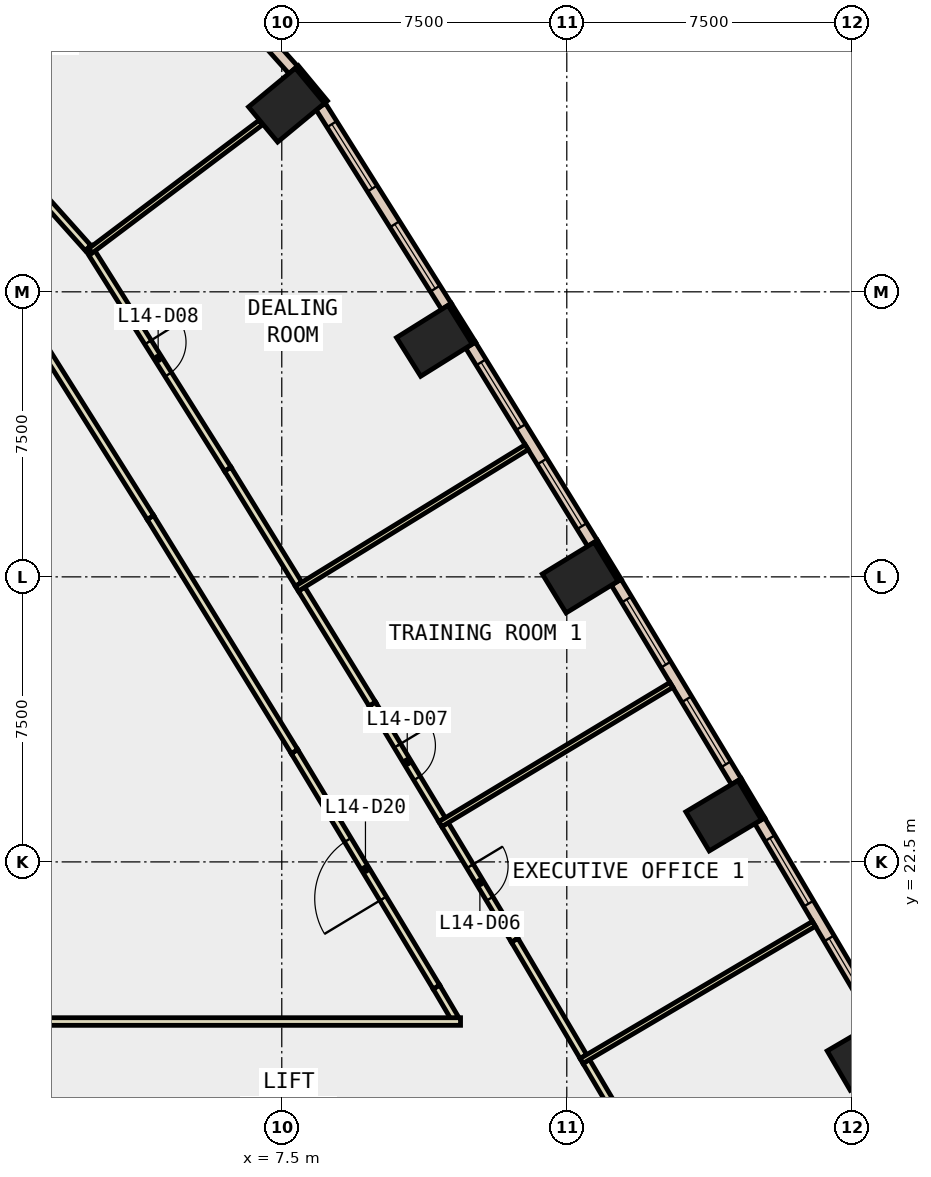
"""IFC4 building model, lengths in metres.
Left out: names, types, materials, properties, quantities, classifications, styles, units other than length and angle.
Written with IfcOpenShell. Run it as: python <this file> out.ifc"""

import sys

from ifc_helpers import new_model, si_unit, direction, frame, frame_2d, origin, origin_2d, place, context, subcontext, project, spatial, rectangle, extrude, element, fill, save


model = new_model("IFC4")
c1 = context("Model", 3, precision=1e-05, world=origin(), true_north=direction((0.0, 1.0)))
c2 = subcontext(c1, "Body", "Model", "MODEL_VIEW")
j1 = project(units=[si_unit("LENGTHUNIT", "METRE"), si_unit("PLANEANGLEUNIT", "RADIAN")], contexts=[c1])
p1 = place(None, origin())
s1 = spatial("IfcSite", under=j1, at=p1, CompositionType="ELEMENT")
p2 = place(p1, origin())
s2 = spatial("IfcBuilding", under=s1, at=p2, CompositionType="ELEMENT")
p3 = place(p2, frame((0.0, 0.0, 68.6)))
s3 = spatial("IfcBuildingStorey", under=s2, at=p3, CompositionType="ELEMENT", Elevation=68.6)
for number, where, z_axis, x_axis in (
    (1, (22.846, 17.413, -0.4), (0.0, 0.0, 1.0), (-0.504, 0.864, 0.0)),
    (2, (19.127, 23.714, -0.4), (0.0, 0.0, 1.0), (-0.513, 0.858, 0.0)),
    (3, (15.351, 29.981, -0.4), (0.0, 0.0, 1.0), (-0.522, 0.853, 0.0)),
    (4, (11.516, 36.211, -0.4), (0.0, 0.0, 1.0), (-0.53, 0.848, 0.0)),
    (5, (7.625, 42.414, -0.4), (0.0, 0.0, 1.0), (-0.638, 0.77, 0.0)),
):
    element("IfcColumn", number, at=place(p3, frame(where, z_axis=z_axis, x_axis=x_axis)), inside=s3, PredefinedType="COLUMN", context=c2, shape_type="SweptSolid", body=[
        extrude(rectangle(XDim=1.2, YDim=1.6, at=origin_2d()), origin(), (0.0, 0.0, 1.0), 4.2),
    ])
for number, where, z_axis, x_axis in (
    (6, (20.165, 23.635, 0.0), (0.0, 0.0, 1.0), (-0.513, 0.858, 0.0)),
    (7, (16.389, 29.912, 0.0), (0.0, 0.0, 1.0), (-0.522, 0.853, 0.0)),
):
    element("IfcWall", number, at=place(p3, frame(where, z_axis=z_axis, x_axis=x_axis)), inside=s3, PredefinedType="STANDARD", context=c2, shape_type="SweptSolid", body=[
        extrude(rectangle(XDim=1.2, YDim=0.1, at=frame_2d((0.6, 0.0))), origin(), (0.0, 0.0, 1.0), 3.8),
    ])
p4 = place(p3, frame((12.555, 36.153, 0.0), z_axis=(0.0, 0.0, 1.0), x_axis=(-0.530273374944, 0.847826720401, 0.0)))
e8 = element("IfcWall", 8, at=p4, inside=s3, PredefinedType="STANDARD", context=c2, shape_type="SweptSolid", body=[
    extrude(rectangle(XDim=1.199, YDim=0.1, at=frame_2d((0.6, 0.0))), origin(), (0.0, 0.0, 1.0), 3.8),
])
p5 = place(p3, frame((8.662, 42.494, 0.0), z_axis=(0.0, 0.0, 1.0), x_axis=(-0.637759271497, 0.770235750676, 0.0)))
e9 = element("IfcWall", 9, at=p5, inside=s3, PredefinedType="STANDARD", context=c2, shape_type="SweptSolid", body=[
    extrude(rectangle(XDim=1.2, YDim=0.1, at=frame_2d((0.6, 0.0))), origin(), (0.0, 0.0, 1.0), 3.8),
])
p6 = place(p3, frame((23.189, 18.307, 0.0), z_axis=(0.0, 0.0, 1.0), x_axis=(-0.508163938648, 0.861260362177, 0.0)))
e10 = element("IfcWall", 10, at=p6, inside=s3, PredefinedType="STANDARD", context=c2, shape_type="SweptSolid", body=[
    extrude(rectangle(XDim=6.126, YDim=0.3, at=frame_2d((3.063, 0.0))), origin(), (0.0, 0.0, 1.0), 3.8),
])
p7 = place(p6, frame((0.531, 0.0, 0.9)))
e11 = element("IfcOpeningElement", 11, at=p7, cuts=e10, PredefinedType="OPENING", context=c2, shape_type="SweptSolid", body=[
    extrude(rectangle(XDim=2.0, YDim=2.6, at=frame_2d((1.0, 1.3))), frame((0.0, 0.16, 0.0), z_axis=(0.0, -1.0, 0.0), x_axis=(1.0, 0.0, 0.0)), (0.0, 0.0, 1.0), 0.32),
])
p8 = place(p6, frame((3.594, 0.0, 0.9)))
e12 = element("IfcOpeningElement", 12, at=p8, cuts=e10, PredefinedType="OPENING", context=c2, shape_type="SweptSolid", body=[
    extrude(rectangle(XDim=2.0, YDim=2.6, at=frame_2d((1.0, 1.3))), frame((0.0, 0.16, 0.0), z_axis=(0.0, -1.0, 0.0), x_axis=(1.0, 0.0, 0.0)), (0.0, 0.0, 1.0), 0.32),
])
p9 = place(p3, frame((19.462, 24.612, 0.0), z_axis=(0.0, 0.0, 1.0), x_axis=(-0.516147563478, 0.856499674674, 0.0)))
e13 = element("IfcWall", 13, at=p9, inside=s3, PredefinedType="STANDARD", context=c2, shape_type="SweptSolid", body=[
    extrude(rectangle(XDim=6.126, YDim=0.3, at=frame_2d((3.063, 0.0))), origin(), (0.0, 0.0, 1.0), 3.8),
])
p10 = place(p9, frame((0.532, 0.0, 0.9)))
e14 = element("IfcOpeningElement", 14, at=p10, cuts=e13, PredefinedType="OPENING", context=c2, shape_type="SweptSolid", body=[
    extrude(rectangle(XDim=2.0, YDim=2.6, at=frame_2d((1.0, 1.3))), frame((0.0, 0.16, 0.0), z_axis=(0.0, -1.0, 0.0), x_axis=(1.0, 0.0, 0.0)), (0.0, 0.0, 1.0), 0.32),
])
p11 = place(p9, frame((3.595, 0.0, 0.9)))
e15 = element("IfcOpeningElement", 15, at=p11, cuts=e13, PredefinedType="OPENING", context=c2, shape_type="SweptSolid", body=[
    extrude(rectangle(XDim=2.0, YDim=2.6, at=frame_2d((1.0, 1.3))), frame((0.0, 0.16, 0.0), z_axis=(0.0, -1.0, 0.0), x_axis=(1.0, 0.0, 0.0)), (0.0, 0.0, 1.0), 0.32),
])
p12 = place(p3, frame((15.677, 30.882, 0.0), z_axis=(0.0, 0.0, 1.0), x_axis=(-0.524239751329, 0.851570715282, 0.0)))
e16 = element("IfcWall", 16, at=p12, inside=s3, PredefinedType="STANDARD", context=c2, shape_type="SweptSolid", body=[
    extrude(rectangle(XDim=6.125, YDim=0.3, at=frame_2d((3.062, 0.0))), origin(), (0.0, 0.0, 1.0), 3.8),
])
p13 = place(p12, frame((0.531, 0.0, 0.9)))
e17 = element("IfcOpeningElement", 17, at=p13, cuts=e16, PredefinedType="OPENING", context=c2, shape_type="SweptSolid", body=[
    extrude(rectangle(XDim=2.0, YDim=2.6, at=frame_2d((1.0, 1.3))), frame((0.0, 0.16, 0.0), z_axis=(0.0, -1.0, 0.0), x_axis=(1.0, 0.0, 0.0)), (0.0, 0.0, 1.0), 0.32),
])
p14 = place(p12, frame((3.594, 0.0, 0.9)))
e18 = element("IfcOpeningElement", 18, at=p14, cuts=e16, PredefinedType="OPENING", context=c2, shape_type="SweptSolid", body=[
    extrude(rectangle(XDim=2.0, YDim=2.6, at=frame_2d((1.0, 1.3))), frame((0.0, 0.16, 0.0), z_axis=(0.0, -1.0, 0.0), x_axis=(1.0, 0.0, 0.0)), (0.0, 0.0, 1.0), 0.32),
])
p15 = place(p3, frame((11.833, 37.116, 0.0), z_axis=(0.0, 0.0, 1.0), x_axis=(-0.532322705893, 0.846541515102, 0.0)))
e19 = element("IfcWall", 19, at=p15, inside=s3, PredefinedType="STANDARD", context=c2, shape_type="SweptSolid", body=[
    extrude(rectangle(XDim=6.218, YDim=0.3, at=frame_2d((3.109, 0.0))), origin(), (0.0, 0.0, 1.0), 3.8),
])
p16 = place(p15, frame((0.555, 0.0, 0.9)))
e20 = element("IfcOpeningElement", 20, at=p16, cuts=e19, PredefinedType="OPENING", context=c2, shape_type="SweptSolid", body=[
    extrude(rectangle(XDim=2.0, YDim=2.6, at=frame_2d((1.0, 1.3))), frame((0.0, 0.16, 0.0), z_axis=(0.0, -1.0, 0.0), x_axis=(1.0, 0.0, 0.0)), (0.0, 0.0, 1.0), 0.32),
])
p17 = place(p15, frame((3.664, 0.0, 0.9)))
e21 = element("IfcOpeningElement", 21, at=p17, cuts=e19, PredefinedType="OPENING", context=c2, shape_type="SweptSolid", body=[
    extrude(rectangle(XDim=2.0, YDim=2.6, at=frame_2d((1.0, 1.3))), frame((0.0, 0.16, 0.0), z_axis=(0.0, -1.0, 0.0), x_axis=(1.0, 0.0, 0.0)), (0.0, 0.0, 1.0), 0.32),
])
p18 = place(p3, frame((7.803, 43.339, 0.0), z_axis=(0.0, 0.0, 1.0), x_axis=(-0.666901909312, 0.745145518242, 0.0)))
e22 = element("IfcWall", 22, at=p18, inside=s3, PredefinedType="STANDARD", context=c2, shape_type="SweptSolid", body=[
    extrude(rectangle(XDim=3.666, YDim=0.3, at=frame_2d((1.833, 0.0))), origin(), (0.0, 0.0, 1.0), 3.8),
])
p19 = place(p18, frame((1.133, 0.0, 0.9)))
e23 = element("IfcOpeningElement", 23, at=p19, cuts=e22, PredefinedType="OPENING", context=c2, shape_type="SweptSolid", body=[
    extrude(rectangle(XDim=1.4, YDim=2.6, at=frame_2d((0.7, 1.3))), frame((0.0, 0.16, 0.0), z_axis=(0.0, -1.0, 0.0), x_axis=(1.0, 0.0, 0.0)), (0.0, 0.0, 1.0), 0.32),
])
p20 = place(p3, frame((12.054, 18.386, 0.0), z_axis=(0.0, 0.0, 1.0), x_axis=(-0.508048285953, 0.861328589529, 0.0)))
e24 = element("IfcWall", 24, at=p20, inside=s3, PredefinedType="PARTITIONING", context=c2, shape_type="SweptSolid", body=[
    extrude(rectangle(XDim=0.954, YDim=0.2, at=frame_2d((0.477, 0.0))), origin(), (0.0, 0.0, 1.0), 3.8),
])
p21 = place(p3, frame((11.569, 19.208, 0.0), z_axis=(0.0, 0.0, 1.0), x_axis=(-0.516172233954, 0.85648480716, 0.0)))
e25 = element("IfcWall", 25, at=p21, inside=s3, PredefinedType="PARTITIONING", context=c2, shape_type="SweptSolid", body=[
    extrude(rectangle(XDim=7.234, YDim=0.2, at=frame_2d((3.617, 0.0))), origin(), (0.0, 0.0, 1.0), 3.8),
])
p22 = place(p21, frame((2.717, 0.0, 0.0)))
e26 = element("IfcOpeningElement", 26, at=p22, cuts=e25, PredefinedType="OPENING", context=c2, shape_type="SweptSolid", body=[
    extrude(rectangle(XDim=1.8, YDim=2.1, at=frame_2d((0.9, 1.05))), frame((0.0, 0.11, 0.0), z_axis=(0.0, -1.0, 0.0), x_axis=(1.0, 0.0, 0.0)), (0.0, 0.0, 1.0), 0.22),
])
p23 = place(p3, frame((7.835, 25.404, 0.0), z_axis=(0.0, 0.0, 1.0), x_axis=(-0.524225471951, 0.851579505717, 0.0)))
e27 = element("IfcWall", 27, at=p23, inside=s3, PredefinedType="PARTITIONING", context=c2, shape_type="SweptSolid", body=[
    extrude(rectangle(XDim=7.233, YDim=0.2, at=frame_2d((3.617, 0.0))), origin(), (0.0, 0.0, 1.0), 3.8),
])
p24 = place(p3, frame((4.043, 31.564, 0.0), z_axis=(0.0, 0.0, 1.0), x_axis=(-0.532301094997, 0.846555104092, 0.0)))
e28 = element("IfcWall", 28, at=p24, inside=s3, PredefinedType="PARTITIONING", context=c2, shape_type="SweptSolid", body=[
    extrude(rectangle(XDim=6.677, YDim=0.2, at=frame_2d((3.338, 0.0))), origin(), (0.0, 0.0, 1.0), 3.8),
])
p25 = place(p3, frame((15.512, 17.248, 0.0), z_axis=(0.0, 0.0, 1.0), x_axis=(0.508178415101, -0.861251820564, 0.0)))
e29 = element("IfcWall", 29, at=p25, inside=s3, PredefinedType="PARTITIONING", context=c2, shape_type="SweptSolid", body=[
    extrude(rectangle(XDim=3.554, YDim=0.2, at=frame_2d((1.777, 0.0))), origin(), (0.0, 0.0, 1.0), 3.8),
])
p26 = place(p3, frame((11.796, 23.481, 0.0), z_axis=(0.0, 0.0, 1.0), x_axis=(0.516070934647, -0.8565458484, 0.0)))
e30 = element("IfcWall", 30, at=p26, inside=s3, PredefinedType="PARTITIONING", context=c2, shape_type="SweptSolid", body=[
    extrude(rectangle(XDim=3.554, YDim=0.2, at=frame_2d((1.777, 0.0))), origin(), (0.0, 0.0, 1.0), 3.8),
])
p27 = place(p26, frame((1.277, 0.0, 0.0)))
e31 = element("IfcOpeningElement", 31, at=p27, cuts=e30, PredefinedType="OPENING", context=c2, shape_type="SweptSolid", body=[
    extrude(rectangle(XDim=1.0, YDim=2.1, at=frame_2d((0.5, 1.05))), frame((0.0, 0.11, 0.0), z_axis=(0.0, -1.0, 0.0), x_axis=(1.0, 0.0, 0.0)), (0.0, 0.0, 1.0), 0.22),
])
p28 = place(p3, frame((13.63, 20.437, 0.0), z_axis=(0.0, 0.0, 1.0), x_axis=(0.508298695021, -0.861180838523, 0.0)))
e32 = element("IfcWall", 32, at=p28, inside=s3, PredefinedType="PARTITIONING", context=c2, shape_type="SweptSolid", body=[
    extrude(rectangle(XDim=3.553, YDim=0.2, at=frame_2d((1.777, 0.0))), origin(), (0.0, 0.0, 1.0), 3.8),
])
p29 = place(p3, frame((8.022, 29.678, 0.0), z_axis=(0.0, 0.0, 1.0), x_axis=(0.524093591744, -0.851660676029, 0.0)))
e33 = element("IfcWall", 33, at=p29, inside=s3, PredefinedType="PARTITIONING", context=c2, shape_type="SweptSolid", body=[
    extrude(rectangle(XDim=3.553, YDim=0.2, at=frame_2d((1.776, 0.0))), origin(), (0.0, 0.0, 1.0), 3.8),
])
p30 = place(p3, frame((9.884, 26.652, 0.0), z_axis=(0.0, 0.0, 1.0), x_axis=(0.516162051318, -0.856490943781, 0.0)))
e34 = element("IfcWall", 34, at=p30, inside=s3, PredefinedType="PARTITIONING", context=c2, shape_type="SweptSolid", body=[
    extrude(rectangle(XDim=3.553, YDim=0.2, at=frame_2d((1.777, 0.0))), origin(), (0.0, 0.0, 1.0), 3.8),
])
p31 = place(p30, frame((1.277, 0.0, 0.0)))
e35 = element("IfcOpeningElement", 35, at=p31, cuts=e34, PredefinedType="OPENING", context=c2, shape_type="SweptSolid", body=[
    extrude(rectangle(XDim=1.0, YDim=2.1, at=frame_2d((0.5, 1.05))), frame((0.0, 0.11, 0.0), z_axis=(0.0, -1.0, 0.0), x_axis=(1.0, 0.0, 0.0)), (0.0, 0.0, 1.0), 0.22),
])
p32 = place(p3, frame((2.413, 38.665, 0.0), z_axis=(0.0, 0.0, 1.0), x_axis=(0.532328273879, -0.846538013812, 0.0)))
e36 = element("IfcWall", 36, at=p32, inside=s3, PredefinedType="PARTITIONING", context=c2, shape_type="SweptSolid", body=[
    extrude(rectangle(XDim=6.89, YDim=0.2, at=frame_2d((3.445, 0.0))), origin(), (0.0, 0.0, 1.0), 3.8),
])
p33 = place(p32, frame((2.945, 0.0, 0.0)))
e37 = element("IfcOpeningElement", 37, at=p33, cuts=e36, PredefinedType="OPENING", context=c2, shape_type="SweptSolid", body=[
    extrude(rectangle(XDim=1.0, YDim=2.1, at=frame_2d((0.5, 1.05))), frame((0.0, 0.11, 0.0), z_axis=(0.0, -1.0, 0.0), x_axis=(1.0, 0.0, 0.0)), (0.0, 0.0, 1.0), 0.22),
])
p34 = place(p3, frame((6.081, 32.832, 0.0), z_axis=(0.0, 0.0, 1.0), x_axis=(0.524062922014, -0.851679548756, 0.0)))
e38 = element("IfcWall", 38, at=p34, inside=s3, PredefinedType="PARTITIONING", context=c2, shape_type="SweptSolid", body=[
    extrude(rectangle(XDim=3.553, YDim=0.2, at=frame_2d((1.777, 0.0))), origin(), (0.0, 0.0, 1.0), 3.8),
])
p35 = place(p3, frame((0.879, 40.355, 0.0), z_axis=(0.0, 0.0, 1.0), x_axis=(0.666791730919, -0.745244112743, 0.0)))
e39 = element("IfcWall", 39, at=p35, inside=s3, PredefinedType="PARTITIONING", context=c2, shape_type="SweptSolid", body=[
    extrude(rectangle(XDim=2.281, YDim=0.2, at=frame_2d((1.141, 0.0))), origin(), (0.0, 0.0, 1.0), 3.8),
])
p36 = place(p3, frame((15.388, 17.261, 0.0), z_axis=(0.0, 0.0, 1.0), x_axis=(0.861189945173, 0.50828326584, 0.0)))
e40 = element("IfcWall", 40, at=p36, inside=s3, PredefinedType="PARTITIONING", context=c2, shape_type="SweptSolid", body=[
    extrude(rectangle(XDim=7.101, YDim=0.15, at=frame_2d((3.55, 0.0))), origin(), (0.0, 0.0, 1.0), 3.8),
])
p37 = place(p3, frame((11.672, 23.493, 0.0), z_axis=(0.0, 0.0, 1.0), x_axis=(0.856462653555, 0.516208991656, 0.0)))
e41 = element("IfcWall", 41, at=p37, inside=s3, PredefinedType="PARTITIONING", context=c2, shape_type="SweptSolid", body=[
    extrude(rectangle(XDim=7.1, YDim=0.15, at=frame_2d((3.55, 0.0))), origin(), (0.0, 0.0, 1.0), 3.8),
])
p38 = place(p3, frame((7.897, 29.69, 0.0), z_axis=(0.0, 0.0, 1.0), x_axis=(0.851604009471, 0.524185664677, 0.0)))
e42 = element("IfcWall", 42, at=p38, inside=s3, PredefinedType="PARTITIONING", context=c2, shape_type="SweptSolid", body=[
    extrude(rectangle(XDim=7.101, YDim=0.15, at=frame_2d((3.55, 0.0))), origin(), (0.0, 0.0, 1.0), 3.8),
])
p39 = place(p3, frame((2.466, 38.58, 0.0), z_axis=(0.0, 0.0, 1.0), x_axis=(0.798796148738, 0.601601789193, 0.0)))
e43 = element("IfcWall", 43, at=p39, inside=s3, PredefinedType="PARTITIONING", context=c2, shape_type="SweptSolid", body=[
    extrude(rectangle(XDim=5.605, YDim=0.15, at=frame_2d((2.802, 0.0))), origin(), (0.0, 0.0, 1.0), 3.8),
])
p40 = place(p3, frame((0.4, 18.3, 0.0), z_axis=(0.0, 0.0, 1.0), x_axis=(1.0, 0.0, 0.0)))
e44 = element("IfcWall", 44, at=p40, inside=s3, PredefinedType="PARTITIONING", context=c2, shape_type="SweptSolid", body=[
    extrude(rectangle(XDim=11.804, YDim=0.2, at=frame_2d((5.902, 0.0))), origin(), (0.0, 0.0, 1.0), 3.8),
])
p41 = place(p7, origin())
e45 = element("IfcWindow", 45, at=p41, inside=s3, PartitioningType="SINGLE_PANEL", PredefinedType="WINDOW", context=c2, shape_type="SweptSolid", body=[
    extrude(rectangle(XDim=2.0, YDim=2.6, at=frame_2d((1.0, 1.3))), frame((0.0, 0.03, 0.0), z_axis=(0.0, -1.0, 0.0), x_axis=(1.0, 0.0, 0.0)), (0.0, 0.0, 1.0), 0.06),
])
fill(e11, e45)
p42 = place(p8, origin())
e46 = element("IfcWindow", 46, at=p42, inside=s3, PartitioningType="SINGLE_PANEL", PredefinedType="WINDOW", context=c2, shape_type="SweptSolid", body=[
    extrude(rectangle(XDim=2.0, YDim=2.6, at=frame_2d((1.0, 1.3))), frame((0.0, 0.03, 0.0), z_axis=(0.0, -1.0, 0.0), x_axis=(1.0, 0.0, 0.0)), (0.0, 0.0, 1.0), 0.06),
])
fill(e12, e46)
p43 = place(p10, origin())
e47 = element("IfcWindow", 47, at=p43, inside=s3, PartitioningType="SINGLE_PANEL", PredefinedType="WINDOW", context=c2, shape_type="SweptSolid", body=[
    extrude(rectangle(XDim=2.0, YDim=2.6, at=frame_2d((1.0, 1.3))), frame((0.0, 0.03, 0.0), z_axis=(0.0, -1.0, 0.0), x_axis=(1.0, 0.0, 0.0)), (0.0, 0.0, 1.0), 0.06),
])
fill(e14, e47)
p44 = place(p11, origin())
e48 = element("IfcWindow", 48, at=p44, inside=s3, PartitioningType="SINGLE_PANEL", PredefinedType="WINDOW", context=c2, shape_type="SweptSolid", body=[
    extrude(rectangle(XDim=2.0, YDim=2.6, at=frame_2d((1.0, 1.3))), frame((0.0, 0.03, 0.0), z_axis=(0.0, -1.0, 0.0), x_axis=(1.0, 0.0, 0.0)), (0.0, 0.0, 1.0), 0.06),
])
fill(e15, e48)
p45 = place(p13, origin())
e49 = element("IfcWindow", 49, at=p45, inside=s3, PartitioningType="SINGLE_PANEL", PredefinedType="WINDOW", context=c2, shape_type="SweptSolid", body=[
    extrude(rectangle(XDim=2.0, YDim=2.6, at=frame_2d((1.0, 1.3))), frame((0.0, 0.03, 0.0), z_axis=(0.0, -1.0, 0.0), x_axis=(1.0, 0.0, 0.0)), (0.0, 0.0, 1.0), 0.06),
])
fill(e17, e49)
p46 = place(p14, origin())
e50 = element("IfcWindow", 50, at=p46, inside=s3, PartitioningType="SINGLE_PANEL", PredefinedType="WINDOW", context=c2, shape_type="SweptSolid", body=[
    extrude(rectangle(XDim=2.0, YDim=2.6, at=frame_2d((1.0, 1.3))), frame((0.0, 0.03, 0.0), z_axis=(0.0, -1.0, 0.0), x_axis=(1.0, 0.0, 0.0)), (0.0, 0.0, 1.0), 0.06),
])
fill(e18, e50)
p47 = place(p16, origin())
e51 = element("IfcWindow", 51, at=p47, inside=s3, PartitioningType="SINGLE_PANEL", PredefinedType="WINDOW", context=c2, shape_type="SweptSolid", body=[
    extrude(rectangle(XDim=2.0, YDim=2.6, at=frame_2d((1.0, 1.3))), frame((0.0, 0.03, 0.0), z_axis=(0.0, -1.0, 0.0), x_axis=(1.0, 0.0, 0.0)), (0.0, 0.0, 1.0), 0.06),
])
fill(e20, e51)
p48 = place(p17, origin())
e52 = element("IfcWindow", 52, at=p48, inside=s3, PartitioningType="SINGLE_PANEL", PredefinedType="WINDOW", context=c2, shape_type="SweptSolid", body=[
    extrude(rectangle(XDim=2.0, YDim=2.6, at=frame_2d((1.0, 1.3))), frame((0.0, 0.03, 0.0), z_axis=(0.0, -1.0, 0.0), x_axis=(1.0, 0.0, 0.0)), (0.0, 0.0, 1.0), 0.06),
])
fill(e21, e52)
p49 = place(p27, origin())
e53 = element("IfcDoor", 53, at=p49, inside=s3, OperationType="SINGLE_SWING_LEFT", PredefinedType="DOOR", context=c2, shape_type="SweptSolid", body=[
    extrude(rectangle(XDim=1.0, YDim=2.1, at=frame_2d((0.5, 1.05))), frame((0.0, 0.025, 0.0), z_axis=(0.0, -1.0, 0.0), x_axis=(1.0, 0.0, 0.0)), (0.0, 0.0, 1.0), 0.05),
])
fill(e31, e53)
p50 = place(p31, origin())
e54 = element("IfcDoor", 54, at=p50, inside=s3, OperationType="SINGLE_SWING_LEFT", PredefinedType="DOOR", context=c2, shape_type="SweptSolid", body=[
    extrude(rectangle(XDim=1.0, YDim=2.1, at=frame_2d((0.5, 1.05))), frame((0.0, 0.025, 0.0), z_axis=(0.0, -1.0, 0.0), x_axis=(1.0, 0.0, 0.0)), (0.0, 0.0, 1.0), 0.05),
])
fill(e35, e54)
p51 = place(p33, origin())
e55 = element("IfcDoor", 55, at=p51, inside=s3, OperationType="SINGLE_SWING_LEFT", PredefinedType="DOOR", context=c2, shape_type="SweptSolid", body=[
    extrude(rectangle(XDim=1.0, YDim=2.1, at=frame_2d((0.5, 1.05))), frame((0.0, 0.025, 0.0), z_axis=(0.0, -1.0, 0.0), x_axis=(1.0, 0.0, 0.0)), (0.0, 0.0, 1.0), 0.05),
])
fill(e37, e55)
p52 = place(p22, origin())
e56 = element("IfcDoor", 56, at=p52, inside=s3, OperationType="DOUBLE_DOOR_SINGLE_SWING", PredefinedType="DOOR", context=c2, shape_type="SweptSolid", body=[
    extrude(rectangle(XDim=1.8, YDim=2.1, at=frame_2d((0.9, 1.05))), frame((0.0, 0.025, 0.0), z_axis=(0.0, -1.0, 0.0), x_axis=(1.0, 0.0, 0.0)), (0.0, 0.0, 1.0), 0.05),
])
fill(e26, e56)
save(model, sys.argv[1])
